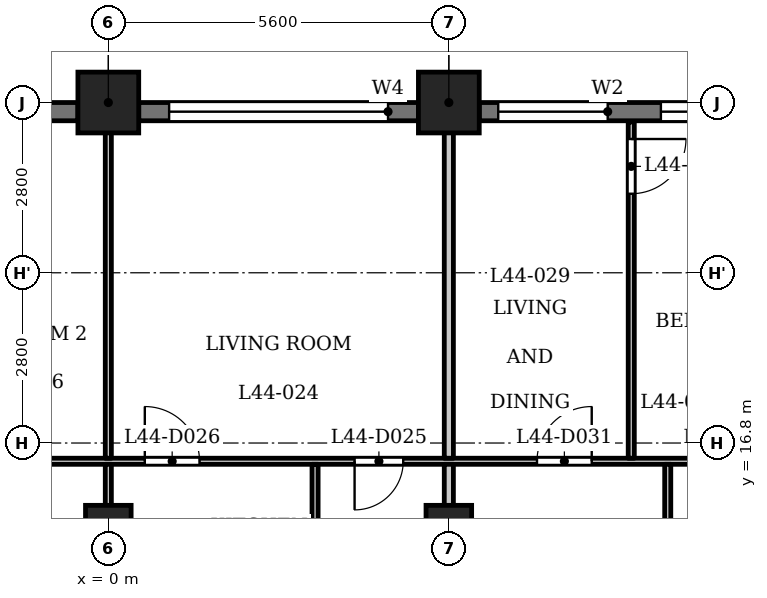
"""IFC4 building model, lengths in metres.
Left out: names, types, materials, properties, quantities, classifications, styles, units other than length and angle.
Written with IfcOpenShell. Run it as: python <this file> out.ifc"""

import sys

from ifc_helpers import new_model, si_unit, direction, frame, frame_2d, origin, origin_2d, place, context, subcontext, project, spatial, rectangle, extrude, element, fill, save


model = new_model("IFC4")
c1 = context("Model", 3, precision=1e-05, world=origin(), true_north=direction((0.0, 1.0)))
c2 = subcontext(c1, "Body", "Model", "MODEL_VIEW")
j1 = project(units=[si_unit("LENGTHUNIT", "METRE"), si_unit("PLANEANGLEUNIT", "RADIAN")], contexts=[c1])
p1 = place(None, origin())
s1 = spatial("IfcSite", under=j1, at=p1, CompositionType="ELEMENT")
p2 = place(p1, origin())
s2 = spatial("IfcBuilding", under=s1, at=p2, CompositionType="ELEMENT")
p3 = place(p2, frame((0.0, 0.0, 171.1)))
s3 = spatial("IfcBuildingStorey", under=s2, at=p3, CompositionType="ELEMENT", Elevation=171.1)
for number, where, z_axis, x_axis in (
    (1, (5.6, 22.4, 0.0), (0.0, 0.0, 1.0), (1.0, 0.0, 0.0)),
    (2, (0.0, 22.4, 0.0), (0.0, 0.0, 1.0), (1.0, 0.0, 0.0)),
):
    element("IfcColumn", number, at=place(p3, frame(where, z_axis=z_axis, x_axis=x_axis)), inside=s3, PredefinedType="COLUMN", context=c2, shape_type="SweptSolid", body=[
        extrude(rectangle(XDim=1.0, YDim=1.0, at=origin_2d()), origin(), (0.0, 0.0, 1.0), 3.5),
    ])
for number, where, z_axis, x_axis in (
    (3, (0.0, 15.4, 0.0), (0.0, 0.0, 1.0), (1.0, 0.0, 0.0)),
    (4, (5.6, 15.4, 0.0), (0.0, 0.0, 1.0), (1.0, 0.0, 0.0)),
):
    element("IfcColumn", number, at=place(p3, frame(where, z_axis=z_axis, x_axis=x_axis)), inside=s3, PredefinedType="COLUMN", context=c2, shape_type="SweptSolid", body=[
        extrude(rectangle(XDim=0.75, YDim=0.75, at=origin_2d()), origin(), (0.0, 0.0, 1.0), 3.5),
    ])
p4 = place(p3, frame((10.7, 22.25, 0.0), z_axis=(0.0, 0.0, 1.0), x_axis=(-1.0, 0.0, 0.0)))
e5 = element("IfcWall", 5, at=p4, inside=s3, PredefinedType="SOLIDWALL", context=c2, shape_type="SweptSolid", body=[
    extrude(rectangle(XDim=4.6, YDim=0.3, at=frame_2d((2.3, 0.0))), origin(), (0.0, 0.0, 1.0), 2.45),
])
p5 = place(p4, frame((0.413, 0.0, 0.6)))
e6 = element("IfcOpeningElement", 6, at=p5, cuts=e5, PredefinedType="OPENING", context=c2, shape_type="SweptSolid", body=[
    extrude(rectangle(XDim=1.2, YDim=1.55, at=frame_2d((0.6, 0.775))), frame((0.0, 0.16, 0.0), z_axis=(0.0, -1.0, 0.0), x_axis=(1.0, 0.0, 0.0)), (0.0, 0.0, 1.0), 0.32),
])
p6 = place(p4, frame((2.488, 0.0, 0.9)))
e7 = element("IfcOpeningElement", 7, at=p6, cuts=e5, PredefinedType="OPENING", context=c2, shape_type="SweptSolid", body=[
    extrude(rectangle(XDim=1.8, YDim=1.25, at=frame_2d((0.9, 0.625))), frame((0.0, 0.16, 0.0), z_axis=(0.0, -1.0, 0.0), x_axis=(1.0, 0.0, 0.0)), (0.0, 0.0, 1.0), 0.32),
])
p7 = place(p3, frame((5.1, 22.25, 0.0), z_axis=(0.0, 0.0, 1.0), x_axis=(-1.0, 0.0, 0.0)))
e8 = element("IfcWall", 8, at=p7, inside=s3, PredefinedType="SOLIDWALL", context=c2, shape_type="SweptSolid", body=[
    extrude(rectangle(XDim=4.6, YDim=0.3, at=frame_2d((2.3, 0.0))), origin(), (0.0, 0.0, 1.0), 2.45),
])
p8 = place(p7, frame((0.5, 0.0, 1.2)))
e9 = element("IfcOpeningElement", 9, at=p8, cuts=e8, PredefinedType="OPENING", context=c2, shape_type="SweptSolid", body=[
    extrude(rectangle(XDim=3.6, YDim=0.95, at=frame_2d((1.8, 0.475))), frame((0.0, 0.16, 0.0), z_axis=(0.0, -1.0, 0.0), x_axis=(1.0, 0.0, 0.0)), (0.0, 0.0, 1.0), 0.32),
])
p9 = place(p3, frame((-0.5, 22.25, 0.0), z_axis=(0.0, 0.0, 1.0), x_axis=(-1.0, 0.0, 0.0)))
e10 = element("IfcWall", 10, at=p9, inside=s3, PredefinedType="SOLIDWALL", context=c2, shape_type="SweptSolid", body=[
    extrude(rectangle(XDim=4.6, YDim=0.3, at=frame_2d((2.3, 0.0))), origin(), (0.0, 0.0, 1.0), 2.45),
])
p10 = place(p9, frame((0.512, 0.0, 0.6)))
e11 = element("IfcOpeningElement", 11, at=p10, cuts=e10, PredefinedType="OPENING", context=c2, shape_type="SweptSolid", body=[
    extrude(rectangle(XDim=1.2, YDim=1.55, at=frame_2d((0.6, 0.775))), frame((0.0, 0.16, 0.0), z_axis=(0.0, -1.0, 0.0), x_axis=(1.0, 0.0, 0.0)), (0.0, 0.0, 1.0), 0.32),
])
p11 = place(p9, frame((2.887, 0.0, 0.6)))
e12 = element("IfcOpeningElement", 12, at=p11, cuts=e10, PredefinedType="OPENING", context=c2, shape_type="SweptSolid", body=[
    extrude(rectangle(XDim=1.2, YDim=1.55, at=frame_2d((0.6, 0.775))), frame((0.0, 0.16, 0.0), z_axis=(0.0, -1.0, 0.0), x_axis=(1.0, 0.0, 0.0)), (0.0, 0.0, 1.0), 0.32),
])
p12 = place(p3, frame((-16.725, 16.5, 0.0), z_axis=(0.0, 0.0, 1.0), x_axis=(1.0, 0.0, 0.0)))
e13 = element("IfcWall", 13, at=p12, inside=s3, PredefinedType="PARTITIONING", context=c2, shape_type="SweptSolid", body=[
    extrude(rectangle(XDim=33.45, YDim=0.1, at=frame_2d((16.725, 0.0))), origin(), (0.0, 0.0, 1.0), 3.2),
])
p13 = place(p12, frame((0.575, 0.0, 0.0)))
e14 = element("IfcOpeningElement", 14, at=p13, cuts=e13, PredefinedType="OPENING", context=c2, shape_type="SweptSolid", body=[
    extrude(rectangle(XDim=0.8, YDim=2.1, at=frame_2d((0.4, 1.05))), frame((0.0, 0.06, 0.0), z_axis=(0.0, -1.0, 0.0), x_axis=(1.0, 0.0, 0.0)), (0.0, 0.0, 1.0), 0.12),
])
p14 = place(p12, frame((3.225, 0.0, 0.0)))
e15 = element("IfcOpeningElement", 15, at=p14, cuts=e13, PredefinedType="OPENING", context=c2, shape_type="SweptSolid", body=[
    extrude(rectangle(XDim=0.9, YDim=2.1, at=frame_2d((0.45, 1.05))), frame((0.0, 0.06, 0.0), z_axis=(0.0, -1.0, 0.0), x_axis=(1.0, 0.0, 0.0)), (0.0, 0.0, 1.0), 0.12),
])
p15 = place(p12, frame((6.775, 0.0, 0.0)))
e16 = element("IfcOpeningElement", 16, at=p15, cuts=e13, PredefinedType="OPENING", context=c2, shape_type="SweptSolid", body=[
    extrude(rectangle(XDim=0.9, YDim=2.1, at=frame_2d((0.45, 1.05))), frame((0.0, 0.06, 0.0), z_axis=(0.0, -1.0, 0.0), x_axis=(1.0, 0.0, 0.0)), (0.0, 0.0, 1.0), 0.12),
])
p16 = place(p12, frame((8.825, 0.0, 0.0)))
e17 = element("IfcOpeningElement", 17, at=p16, cuts=e13, PredefinedType="OPENING", context=c2, shape_type="SweptSolid", body=[
    extrude(rectangle(XDim=0.9, YDim=2.1, at=frame_2d((0.45, 1.05))), frame((0.0, 0.06, 0.0), z_axis=(0.0, -1.0, 0.0), x_axis=(1.0, 0.0, 0.0)), (0.0, 0.0, 1.0), 0.12),
])
p17 = place(p12, frame((20.775, 0.0, 0.0)))
e18 = element("IfcOpeningElement", 18, at=p17, cuts=e13, PredefinedType="OPENING", context=c2, shape_type="SweptSolid", body=[
    extrude(rectangle(XDim=0.8, YDim=2.1, at=frame_2d((0.4, 1.05))), frame((0.0, 0.06, 0.0), z_axis=(0.0, -1.0, 0.0), x_axis=(1.0, 0.0, 0.0)), (0.0, 0.0, 1.0), 0.12),
])
p18 = place(p12, frame((17.325, 0.0, 0.0)))
e19 = element("IfcOpeningElement", 19, at=p18, cuts=e13, PredefinedType="OPENING", context=c2, shape_type="SweptSolid", body=[
    extrude(rectangle(XDim=0.9, YDim=2.1, at=frame_2d((0.45, 1.05))), frame((0.0, 0.06, 0.0), z_axis=(0.0, -1.0, 0.0), x_axis=(1.0, 0.0, 0.0)), (0.0, 0.0, 1.0), 0.12),
])
p19 = place(p12, frame((12.375, 0.0, 0.0)))
e20 = element("IfcOpeningElement", 20, at=p19, cuts=e13, PredefinedType="OPENING", context=c2, shape_type="SweptSolid", body=[
    extrude(rectangle(XDim=0.9, YDim=2.1, at=frame_2d((0.45, 1.05))), frame((0.0, 0.06, 0.0), z_axis=(0.0, -1.0, 0.0), x_axis=(1.0, 0.0, 0.0)), (0.0, 0.0, 1.0), 0.12),
])
p20 = place(p12, frame((14.425, 0.0, 0.0)))
e21 = element("IfcOpeningElement", 21, at=p20, cuts=e13, PredefinedType="OPENING", context=c2, shape_type="SweptSolid", body=[
    extrude(rectangle(XDim=0.9, YDim=2.1, at=frame_2d((0.45, 1.05))), frame((0.0, 0.06, 0.0), z_axis=(0.0, -1.0, 0.0), x_axis=(1.0, 0.0, 0.0)), (0.0, 0.0, 1.0), 0.12),
])
p21 = place(p12, frame((26.575, 0.0, 0.0)))
e22 = element("IfcOpeningElement", 22, at=p21, cuts=e13, PredefinedType="OPENING", context=c2, shape_type="SweptSolid", body=[
    extrude(rectangle(XDim=0.8, YDim=2.1, at=frame_2d((0.4, 1.05))), frame((0.0, 0.06, 0.0), z_axis=(0.0, -1.0, 0.0), x_axis=(1.0, 0.0, 0.0)), (0.0, 0.0, 1.0), 0.12),
])
p22 = place(p12, frame((23.775, 0.0, 0.0)))
e23 = element("IfcOpeningElement", 23, at=p22, cuts=e13, PredefinedType="OPENING", context=c2, shape_type="SweptSolid", body=[
    extrude(rectangle(XDim=0.9, YDim=2.1, at=frame_2d((0.45, 1.05))), frame((0.0, 0.06, 0.0), z_axis=(0.0, -1.0, 0.0), x_axis=(1.0, 0.0, 0.0)), (0.0, 0.0, 1.0), 0.12),
])
p23 = place(p12, frame((32.075, 0.0, 0.0)))
e24 = element("IfcOpeningElement", 24, at=p23, cuts=e13, PredefinedType="OPENING", context=c2, shape_type="SweptSolid", body=[
    extrude(rectangle(XDim=0.8, YDim=2.1, at=frame_2d((0.4, 1.05))), frame((0.0, 0.06, 0.0), z_axis=(0.0, -1.0, 0.0), x_axis=(1.0, 0.0, 0.0)), (0.0, 0.0, 1.0), 0.12),
])
p24 = place(p12, frame((29.375, 0.0, 0.0)))
e25 = element("IfcOpeningElement", 25, at=p24, cuts=e13, PredefinedType="OPENING", context=c2, shape_type="SweptSolid", body=[
    extrude(rectangle(XDim=0.9, YDim=2.1, at=frame_2d((0.45, 1.05))), frame((0.0, 0.06, 0.0), z_axis=(0.0, -1.0, 0.0), x_axis=(1.0, 0.0, 0.0)), (0.0, 0.0, 1.0), 0.12),
])
p25 = place(p3, frame((0.0, 13.275, 0.0), z_axis=(0.0, 0.0, 1.0), x_axis=(0.0, 1.0, 0.0)))
e26 = element("IfcWall", 26, at=p25, inside=s3, PredefinedType="PARTITIONING", context=c2, shape_type="SweptSolid", body=[
    extrude(rectangle(XDim=3.175, YDim=0.1, at=frame_2d((1.587, 0.0))), origin(), (0.0, 0.0, 1.0), 3.2),
])
p26 = place(p25, frame((0.576, 0.0, 0.0)))
e27 = element("IfcOpeningElement", 27, at=p26, cuts=e26, PredefinedType="OPENING", context=c2, shape_type="SweptSolid", body=[
    extrude(rectangle(XDim=0.9, YDim=2.1, at=frame_2d((0.45, 1.05))), frame((0.0, 0.06, 0.0), z_axis=(0.0, -1.0, 0.0), x_axis=(1.0, 0.0, 0.0)), (0.0, 0.0, 1.0), 0.12),
])
p27 = place(p3, frame((0.0, 16.55, 0.0), z_axis=(0.0, 0.0, 1.0), x_axis=(0.0, 1.0, 0.0)))
e28 = element("IfcWall", 28, at=p27, inside=s3, PredefinedType="PARTITIONING", context=c2, shape_type="SweptSolid", body=[
    extrude(rectangle(XDim=6.33, YDim=0.1, at=frame_2d((3.165, 0.0))), origin(), (0.0, 0.0, 1.0), 3.2),
])
p28 = place(p3, frame((3.4, 13.275, 0.0), z_axis=(0.0, 0.0, 1.0), x_axis=(0.0, 1.0, 0.0)))
e29 = element("IfcWall", 29, at=p28, inside=s3, PredefinedType="PARTITIONING", context=c2, shape_type="SweptSolid", body=[
    extrude(rectangle(XDim=3.175, YDim=0.1, at=frame_2d((1.587, 0.0))), origin(), (0.0, 0.0, 1.0), 3.2),
])
p29 = place(p3, frame((5.6, 13.275, 0.0), z_axis=(0.0, 0.0, 1.0), x_axis=(0.0, 1.0, 0.0)))
e30 = element("IfcWall", 30, at=p29, inside=s3, PredefinedType="PARTITIONING", context=c2, shape_type="SweptSolid", body=[
    extrude(rectangle(XDim=3.175, YDim=0.15, at=frame_2d((1.587, 0.0))), origin(), (0.0, 0.0, 1.0), 3.2),
])
p30 = place(p3, frame((5.6, 16.55, 0.0), z_axis=(0.0, 0.0, 1.0), x_axis=(0.0, 1.0, 0.0)))
e31 = element("IfcWall", 31, at=p30, inside=s3, PredefinedType="PARTITIONING", context=c2, shape_type="SweptSolid", body=[
    extrude(rectangle(XDim=6.33, YDim=0.15, at=frame_2d((3.165, 0.0))), origin(), (0.0, 0.0, 1.0), 3.2),
])
p31 = place(p3, frame((8.6, 16.55, 0.0), z_axis=(0.0, 0.0, 1.0), x_axis=(0.0, 1.0, 0.0)))
e32 = element("IfcWall", 32, at=p31, inside=s3, PredefinedType="PARTITIONING", context=c2, shape_type="SweptSolid", body=[
    extrude(rectangle(XDim=5.53, YDim=0.1, at=frame_2d((2.765, 0.0))), origin(), (0.0, 0.0, 1.0), 3.2),
])
p32 = place(p31, frame((4.35, 0.0, 0.0)))
e33 = element("IfcOpeningElement", 33, at=p32, cuts=e32, PredefinedType="OPENING", context=c2, shape_type="SweptSolid", body=[
    extrude(rectangle(XDim=0.9, YDim=2.1, at=frame_2d((0.45, 1.05))), frame((0.0, 0.06, 0.0), z_axis=(0.0, -1.0, 0.0), x_axis=(1.0, 0.0, 0.0)), (0.0, 0.0, 1.0), 0.12),
])
p33 = place(p3, frame((9.2, 13.275, 0.0), z_axis=(0.0, 0.0, 1.0), x_axis=(0.0, 1.0, 0.0)))
e34 = element("IfcWall", 34, at=p33, inside=s3, PredefinedType="PARTITIONING", context=c2, shape_type="SweptSolid", body=[
    extrude(rectangle(XDim=3.175, YDim=0.1, at=frame_2d((1.587, 0.0))), origin(), (0.0, 0.0, 1.0), 3.2),
])
p34 = place(p17, origin())
e35 = element("IfcDoor", 35, at=p34, inside=s3, OperationType="SINGLE_SWING_LEFT", PredefinedType="DOOR", context=c2, shape_type="SweptSolid", body=[
    extrude(rectangle(XDim=0.8, YDim=2.1, at=frame_2d((0.4, 1.05))), frame((0.0, 0.025, 0.0), z_axis=(0.0, -1.0, 0.0), x_axis=(1.0, 0.0, 0.0)), (0.0, 0.0, 1.0), 0.05),
])
fill(e18, e35)
p35 = place(p18, origin())
e36 = element("IfcDoor", 36, at=p35, inside=s3, OperationType="SINGLE_SWING_RIGHT", PredefinedType="DOOR", context=c2, shape_type="SweptSolid", body=[
    extrude(rectangle(XDim=0.9, YDim=2.1, at=frame_2d((0.45, 1.05))), frame((0.0, 0.025, 0.0), z_axis=(0.0, -1.0, 0.0), x_axis=(1.0, 0.0, 0.0)), (0.0, 0.0, 1.0), 0.05),
])
fill(e19, e36)
p36 = place(p22, origin())
e37 = element("IfcDoor", 37, at=p36, inside=s3, OperationType="SINGLE_SWING_LEFT", PredefinedType="DOOR", context=c2, shape_type="SweptSolid", body=[
    extrude(rectangle(XDim=0.9, YDim=2.1, at=frame_2d((0.45, 1.05))), frame((0.0, 0.025, 0.0), z_axis=(0.0, -1.0, 0.0), x_axis=(1.0, 0.0, 0.0)), (0.0, 0.0, 1.0), 0.05),
])
fill(e23, e37)
p37 = place(p32, origin())
e38 = element("IfcDoor", 38, at=p37, inside=s3, OperationType="SINGLE_SWING_RIGHT", PredefinedType="DOOR", context=c2, shape_type="SweptSolid", body=[
    extrude(rectangle(XDim=0.9, YDim=2.1, at=frame_2d((0.45, 1.05))), frame((0.0, 0.025, 0.0), z_axis=(0.0, -1.0, 0.0), x_axis=(1.0, 0.0, 0.0)), (0.0, 0.0, 1.0), 0.05),
])
fill(e33, e38)
p38 = place(p5, origin())
e39 = element("IfcWindow", 39, at=p38, inside=s3, PartitioningType="SINGLE_PANEL", PredefinedType="WINDOW", context=c2, shape_type="SweptSolid", body=[
    extrude(rectangle(XDim=1.2, YDim=1.55, at=frame_2d((0.6, 0.775))), frame((0.0, 0.03, 0.0), z_axis=(0.0, -1.0, 0.0), x_axis=(1.0, 0.0, 0.0)), (0.0, 0.0, 1.0), 0.06),
])
fill(e6, e39)
p39 = place(p6, origin())
e40 = element("IfcWindow", 40, at=p39, inside=s3, PartitioningType="SINGLE_PANEL", PredefinedType="WINDOW", context=c2, shape_type="SweptSolid", body=[
    extrude(rectangle(XDim=1.8, YDim=1.25, at=frame_2d((0.9, 0.625))), frame((0.0, 0.03, 0.0), z_axis=(0.0, -1.0, 0.0), x_axis=(1.0, 0.0, 0.0)), (0.0, 0.0, 1.0), 0.06),
])
fill(e7, e40)
p40 = place(p8, origin())
e41 = element("IfcWindow", 41, at=p40, inside=s3, PartitioningType="SINGLE_PANEL", PredefinedType="WINDOW", context=c2, shape_type="SweptSolid", body=[
    extrude(rectangle(XDim=3.6, YDim=0.95, at=frame_2d((1.8, 0.475))), frame((0.0, 0.03, 0.0), z_axis=(0.0, -1.0, 0.0), x_axis=(1.0, 0.0, 0.0)), (0.0, 0.0, 1.0), 0.06),
])
fill(e9, e41)
save(model, sys.argv[1])
